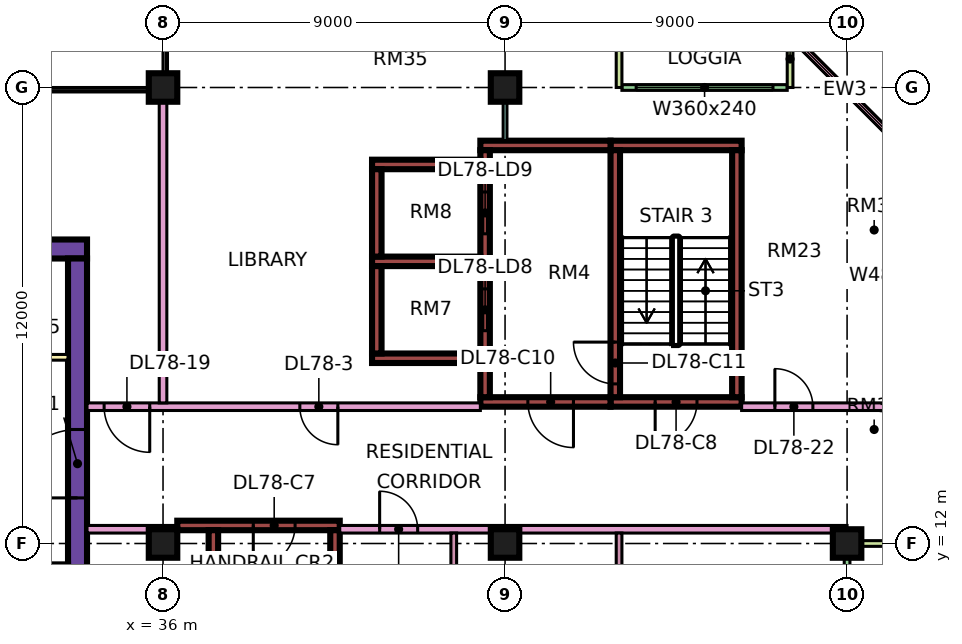
"""IFC4 building model, lengths in metres.
Left out: names, types, materials, properties, quantities, classifications, styles, units other than length and angle.
Written with IfcOpenShell. Run it as: python <this file> out.ifc"""

import sys

from ifc_helpers import new_model, si_unit, direction, frame, frame_2d, origin, origin_2d, place, context, subcontext, project, spatial, rectangle, extrude, element, fill, save


model = new_model("IFC4")
c1 = context("Model", 3, precision=1e-05, world=origin(), true_north=direction((0.0, 1.0)))
c2 = subcontext(c1, "Body", "Model", "MODEL_VIEW")
j1 = project(units=[si_unit("LENGTHUNIT", "METRE"), si_unit("PLANEANGLEUNIT", "RADIAN")], contexts=[c1])
p1 = place(None, origin())
s1 = spatial("IfcSite", under=j1, at=p1, CompositionType="ELEMENT")
p2 = place(p1, origin())
s2 = spatial("IfcBuilding", under=s1, at=p2, CompositionType="ELEMENT")
p3 = place(p2, frame((0.0, 0.0, 338.9)))
s3 = spatial("IfcBuildingStorey", under=s2, at=p3, CompositionType="ELEMENT", Elevation=338.9)
for number, where, z_axis, x_axis in (
    (1, (36.0, 12.0, 0.0), (0.0, 0.0, 1.0), (1.0, 0.0, 0.0)),
    (2, (36.0, 24.0, 0.0), (0.0, 0.0, 1.0), (1.0, 0.0, 0.0)),
    (3, (45.0, 12.0, 0.0), (0.0, 0.0, 1.0), (1.0, 0.0, 0.0)),
    (4, (45.0, 24.0, 0.0), (0.0, 0.0, 1.0), (1.0, 0.0, 0.0)),
    (5, (54.0, 12.0, 0.0), (0.0, 0.0, 1.0), (1.0, 0.0, 0.0)),
):
    element("IfcColumn", number, at=place(p3, frame(where, z_axis=z_axis, x_axis=x_axis)), inside=s3, PredefinedType="COLUMN", context=c2, shape_type="SweptSolid", body=[
        extrude(rectangle(XDim=0.75, YDim=0.75, at=origin_2d()), origin(), (0.0, 0.0, 1.0), 3.75),
    ])
p4 = place(p3, frame((9.0, 19.75, 0.0), z_axis=(0.0, 0.0, 1.0), x_axis=(1.0, 0.0, 0.0)))
e6 = element("IfcWall", 6, at=p4, inside=s3, PredefinedType="SHEAR", context=c2, shape_type="SweptSolid", body=[
    extrude(rectangle(XDim=25.0, YDim=0.5, at=frame_2d((12.5, 0.0))), origin(), (0.0, 0.0, 1.0), 3.75),
])
p5 = place(p4, frame((19.1, 0.0, 0.0)))
e7 = element("IfcOpeningElement", 7, at=p5, cuts=e6, PredefinedType="OPENING", context=c2, shape_type="SweptSolid", body=[
    extrude(rectangle(XDim=1.8, YDim=2.4, at=frame_2d((0.9, 1.2))), frame((0.0, 0.26, 0.0), z_axis=(0.0, -1.0, 0.0), x_axis=(1.0, 0.0, 0.0)), (0.0, 0.0, 1.0), 0.52),
])
p6 = place(p3, frame((33.75, 7.5, 0.0), z_axis=(0.0, 0.0, 1.0), x_axis=(0.0, 1.0, 0.0)))
e8 = element("IfcWall", 8, at=p6, inside=s3, PredefinedType="SHEAR", context=c2, shape_type="SweptSolid", body=[
    extrude(rectangle(XDim=12.0, YDim=0.5, at=frame_2d((6.0, 0.0))), origin(), (0.0, 0.0, 1.0), 3.75),
])
p7 = place(p6, frame((5.7, 0.0, 0.0)))
e9 = element("IfcOpeningElement", 9, at=p7, cuts=e8, PredefinedType="OPENING", context=c2, shape_type="SweptSolid", body=[
    extrude(rectangle(XDim=1.8, YDim=2.4, at=frame_2d((0.9, 1.2))), frame((0.0, 0.26, 0.0), z_axis=(0.0, -1.0, 0.0), x_axis=(1.0, 0.0, 0.0)), (0.0, 0.0, 1.0), 0.52),
])
p8 = place(p3, frame((36.375, 12.475, 0.0), z_axis=(0.0, 0.0, 1.0), x_axis=(1.0, 0.0, 0.0)))
e10 = element("IfcWall", 10, at=p8, inside=s3, PredefinedType="SHEAR", context=c2, shape_type="SweptSolid", body=[
    extrude(rectangle(XDim=4.275, YDim=0.25, at=frame_2d((2.137, 0.0))), origin(), (0.0, 0.0, 1.0), 3.75),
])
p9 = place(p8, frame((2.0, 0.0, 0.0)))
e11 = element("IfcOpeningElement", 11, at=p9, cuts=e10, PredefinedType="OPENING", context=c2, shape_type="SweptSolid", body=[
    extrude(rectangle(XDim=1.1, YDim=2.2, at=frame_2d((0.55, 1.1))), frame((0.0, 0.135, 0.0), z_axis=(0.0, -1.0, 0.0), x_axis=(1.0, 0.0, 0.0)), (0.0, 0.0, 1.0), 0.27),
])
for number, where, z_axis, x_axis in (
    (12, (37.325, 5.85, 0.0), (0.0, 0.0, 1.0), (0.0, 1.0, 0.0)),
    (13, (40.525, 5.85, 0.0), (0.0, 0.0, 1.0), (0.0, 1.0, 0.0)),
):
    element("IfcWall", number, at=place(p3, frame(where, z_axis=z_axis, x_axis=x_axis)), inside=s3, PredefinedType="SHEAR", context=c2, shape_type="SweptSolid", body=[
        extrude(rectangle(XDim=6.5, YDim=0.25, at=frame_2d((3.25, 0.0))), origin(), (0.0, 0.0, 1.0), 3.75),
    ])
p10 = place(p3, frame((47.775, 15.725, 0.0), z_axis=(0.0, 0.0, 1.0), x_axis=(1.0, 0.0, 0.0)))
e14 = element("IfcWall", 14, at=p10, inside=s3, PredefinedType="SHEAR", context=c2, shape_type="SweptSolid", body=[
    extrude(rectangle(XDim=3.45, YDim=0.25, at=frame_2d((1.725, 0.0))), origin(), (0.0, 0.0, 1.0), 3.75),
])
p11 = place(p10, frame((1.175, 0.0, 0.0)))
e15 = element("IfcOpeningElement", 15, at=p11, cuts=e14, PredefinedType="OPENING", context=c2, shape_type="SweptSolid", body=[
    extrude(rectangle(XDim=1.1, YDim=2.2, at=frame_2d((0.55, 1.1))), frame((0.0, 0.135, 0.0), z_axis=(0.0, -1.0, 0.0), x_axis=(1.0, 0.0, 0.0)), (0.0, 0.0, 1.0), 0.27),
])
p12 = place(p3, frame((47.775, 22.475, 0.0), z_axis=(0.0, 0.0, 1.0), x_axis=(1.0, 0.0, 0.0)))
e16 = element("IfcWall", 16, at=p12, inside=s3, PredefinedType="SHEAR", context=c2, shape_type="SweptSolid", body=[
    extrude(rectangle(XDim=3.45, YDim=0.25, at=frame_2d((1.725, 0.0))), origin(), (0.0, 0.0, 1.0), 3.75),
])
p13 = place(p3, frame((47.9, 15.85, 0.0), z_axis=(0.0, 0.0, 1.0), x_axis=(0.0, 1.0, 0.0)))
e17 = element("IfcWall", 17, at=p13, inside=s3, PredefinedType="SHEAR", context=c2, shape_type="SweptSolid", body=[
    extrude(rectangle(XDim=6.5, YDim=0.25, at=frame_2d((3.25, 0.0))), origin(), (0.0, 0.0, 1.0), 3.75),
])
p14 = place(p13, frame((0.35, 0.0, 0.0)))
e18 = element("IfcOpeningElement", 18, at=p14, cuts=e17, PredefinedType="OPENING", context=c2, shape_type="SweptSolid", body=[
    extrude(rectangle(XDim=1.1, YDim=2.2, at=frame_2d((0.55, 1.1))), frame((0.0, 0.135, 0.0), z_axis=(0.0, -1.0, 0.0), x_axis=(1.0, 0.0, 0.0)), (0.0, 0.0, 1.0), 0.27),
])
p15 = place(p3, frame((51.1, 15.85, 0.0), z_axis=(0.0, 0.0, 1.0), x_axis=(0.0, 1.0, 0.0)))
e19 = element("IfcWall", 19, at=p15, inside=s3, PredefinedType="SHEAR", context=c2, shape_type="SweptSolid", body=[
    extrude(rectangle(XDim=6.5, YDim=0.25, at=frame_2d((3.25, 0.0))), origin(), (0.0, 0.0, 1.0), 3.75),
])
p16 = place(p3, frame((44.35, 15.725, 0.0), z_axis=(0.0, 0.0, 1.0), x_axis=(1.0, 0.0, 0.0)))
e20 = element("IfcWall", 20, at=p16, inside=s3, PredefinedType="SHEAR", context=c2, shape_type="SweptSolid", body=[
    extrude(rectangle(XDim=3.425, YDim=0.25, at=frame_2d((1.712, 0.0))), origin(), (0.0, 0.0, 1.0), 3.75),
])
p17 = place(p16, frame((1.25, 0.0, 0.0)))
e21 = element("IfcOpeningElement", 21, at=p17, cuts=e20, PredefinedType="OPENING", context=c2, shape_type="SweptSolid", body=[
    extrude(rectangle(XDim=1.2, YDim=2.2, at=frame_2d((0.6, 1.1))), frame((0.0, 0.135, 0.0), z_axis=(0.0, -1.0, 0.0), x_axis=(1.0, 0.0, 0.0)), (0.0, 0.0, 1.0), 0.27),
])
p18 = place(p3, frame((44.35, 22.475, 0.0), z_axis=(0.0, 0.0, 1.0), x_axis=(1.0, 0.0, 0.0)))
e22 = element("IfcWall", 22, at=p18, inside=s3, PredefinedType="SHEAR", context=c2, shape_type="SweptSolid", body=[
    extrude(rectangle(XDim=3.425, YDim=0.25, at=frame_2d((1.712, 0.0))), origin(), (0.0, 0.0, 1.0), 3.75),
])
p19 = place(p3, frame((44.475, 15.85, 0.0), z_axis=(0.0, 0.0, 1.0), x_axis=(0.0, 1.0, 0.0)))
e23 = element("IfcWall", 23, at=p19, inside=s3, PredefinedType="SHEAR", context=c2, shape_type="SweptSolid", body=[
    extrude(rectangle(XDim=6.5, YDim=0.25, at=frame_2d((3.25, 0.0))), origin(), (0.0, 0.0, 1.0), 3.75),
])
p20 = place(p19, frame((1.75, 0.0, 0.0)))
e24 = element("IfcOpeningElement", 24, at=p20, cuts=e23, PredefinedType="OPENING", context=c2, shape_type="SweptSolid", body=[
    extrude(rectangle(XDim=1.1, YDim=2.2, at=frame_2d((0.55, 1.1))), frame((0.0, 0.135, 0.0), z_axis=(0.0, -1.0, 0.0), x_axis=(1.0, 0.0, 0.0)), (0.0, 0.0, 1.0), 0.27),
])
p21 = place(p19, frame((4.3, 0.0, 0.0)))
e25 = element("IfcOpeningElement", 25, at=p21, cuts=e23, PredefinedType="OPENING", context=c2, shape_type="SweptSolid", body=[
    extrude(rectangle(XDim=1.1, YDim=2.2, at=frame_2d((0.55, 1.1))), frame((0.0, 0.135, 0.0), z_axis=(0.0, -1.0, 0.0), x_axis=(1.0, 0.0, 0.0)), (0.0, 0.0, 1.0), 0.27),
])
for number, where, z_axis, x_axis in (
    (26, (41.5, 16.875, 0.0), (0.0, 0.0, 1.0), (1.0, 0.0, 0.0)),
    (27, (41.5, 19.425, 0.0), (0.0, 0.0, 1.0), (1.0, 0.0, 0.0)),
    (28, (41.5, 21.975, 0.0), (0.0, 0.0, 1.0), (1.0, 0.0, 0.0)),
):
    element("IfcWall", number, at=place(p3, frame(where, z_axis=z_axis, x_axis=x_axis)), inside=s3, PredefinedType="SHEAR", context=c2, shape_type="SweptSolid", body=[
        extrude(rectangle(XDim=2.85, YDim=0.25, at=frame_2d((1.425, 0.0))), origin(), (0.0, 0.0, 1.0), 3.75),
    ])
for number, where, z_axis, x_axis in (
    (29, (41.625, 17.0, 0.0), (0.0, 0.0, 1.0), (0.0, 1.0, 0.0)),
    (30, (41.625, 19.55, 0.0), (0.0, 0.0, 1.0), (0.0, 1.0, 0.0)),
):
    element("IfcWall", number, at=place(p3, frame(where, z_axis=z_axis, x_axis=x_axis)), inside=s3, PredefinedType="SHEAR", context=c2, shape_type="SweptSolid", body=[
        extrude(rectangle(XDim=2.3, YDim=0.25, at=frame_2d((1.15, 0.0))), origin(), (0.0, 0.0, 1.0), 3.75),
    ])
p22 = place(p3, frame((52.425, 24.0, 0.0), z_axis=(0.0, 0.0, 1.0), x_axis=(-1.0, 0.0, 0.0)))
e31 = element("IfcWall", 31, at=p22, inside=s3, PredefinedType="SOLIDWALL", context=c2, shape_type="SweptSolid", body=[
    extrude(rectangle(XDim=4.35, YDim=0.15, at=frame_2d((2.175, 0.0))), origin(), (0.0, 0.0, 1.0), 3.35),
])
p23 = place(p22, frame((0.375, 0.0, 0.45)))
e32 = element("IfcOpeningElement", 32, at=p23, cuts=e31, PredefinedType="OPENING", context=c2, shape_type="SweptSolid", body=[
    extrude(rectangle(XDim=3.6, YDim=2.4, at=frame_2d((1.8, 1.2))), frame((0.0, 0.085, 0.0), z_axis=(0.0, -1.0, 0.0), x_axis=(1.0, 0.0, 0.0)), (0.0, 0.0, 1.0), 0.17),
])
for number, where, z_axis, x_axis in (
    (33, (52.5, 25.5, 0.0), (0.0, 0.0, 1.0), (0.0, -1.0, 0.0)),
    (34, (48.0, 25.5, 0.0), (0.0, 0.0, 1.0), (0.0, -1.0, 0.0)),
):
    element("IfcWall", number, at=place(p3, frame(where, z_axis=z_axis, x_axis=x_axis)), inside=s3, PredefinedType="SOLIDWALL", context=c2, shape_type="SweptSolid", body=[
        extrude(rectangle(XDim=1.5, YDim=0.15, at=frame_2d((0.75, 0.0))), origin(), (0.0, 0.0, 1.0), 3.35),
    ])
p24 = place(p3, frame((54.0, 1.575, 0.0), z_axis=(0.0, 0.0, 1.0), x_axis=(0.0, 1.0, 0.0)))
e35 = element("IfcWall", 35, at=p24, inside=s3, PredefinedType="SOLIDWALL", context=c2, shape_type="SweptSolid", body=[
    extrude(rectangle(XDim=10.35, YDim=0.15, at=frame_2d((5.175, 0.0))), origin(), (0.0, 0.0, 1.0), 3.35),
])
p25 = place(p24, frame((0.663, 0.0, 0.0)))
e36 = element("IfcOpeningElement", 36, at=p25, cuts=e35, PredefinedType="OPENING", context=c2, shape_type="SweptSolid", body=[
    extrude(rectangle(XDim=1.8, YDim=2.4, at=frame_2d((0.9, 1.2))), frame((0.0, 0.085, 0.0), z_axis=(0.0, -1.0, 0.0), x_axis=(1.0, 0.0, 0.0)), (0.0, 0.0, 1.0), 0.17),
])
p26 = place(p24, frame((5.637, 0.0, 0.45)))
e37 = element("IfcOpeningElement", 37, at=p26, cuts=e35, PredefinedType="OPENING", context=c2, shape_type="SweptSolid", body=[
    extrude(rectangle(XDim=3.0, YDim=2.4, at=frame_2d((1.5, 1.2))), frame((0.0, 0.085, 0.0), z_axis=(0.0, -1.0, 0.0), x_axis=(1.0, 0.0, 0.0)), (0.0, 0.0, 1.0), 0.17),
])
p27 = place(p3, frame((55.5, 12.0, 0.0), z_axis=(0.0, 0.0, 1.0), x_axis=(-1.0, 0.0, 0.0)))
e38 = element("IfcWall", 38, at=p27, inside=s3, PredefinedType="SOLIDWALL", context=c2, shape_type="SweptSolid", body=[
    extrude(rectangle(XDim=1.5, YDim=0.15, at=frame_2d((0.75, 0.0))), origin(), (0.0, 0.0, 1.0), 3.35),
])
p28 = place(p3, frame((55.447, 22.447, 0.0), z_axis=(0.0, 0.0, 1.0), x_axis=(-0.707106781187, 0.707106781187, 0.0)))
e39 = element("IfcWall", 39, at=p28, inside=s3, PredefinedType="SOLIDWALL", context=c2, shape_type="SweptSolid", body=[
    extrude(rectangle(XDim=4.243, YDim=0.15, at=frame_2d((2.121, 0.0))), origin(), (0.0, 0.0, 1.0), 3.35),
])
p29 = place(p28, frame((0.621, 0.0, 0.45)))
e40 = element("IfcOpeningElement", 40, at=p29, cuts=e39, PredefinedType="OPENING", context=c2, shape_type="SweptSolid", body=[
    extrude(rectangle(XDim=3.0, YDim=2.4, at=frame_2d((1.5, 1.2))), frame((0.0, 0.085, 0.0), z_axis=(0.0, -1.0, 0.0), x_axis=(1.0, 0.0, 0.0)), (0.0, 0.0, 1.0), 0.17),
])
p30 = place(p3, frame((31.1, 16.9, 0.0), z_axis=(0.0, 0.0, 1.0), x_axis=(1.0, 0.0, 0.0)))
e41 = element("IfcWall", 41, at=p30, inside=s3, PredefinedType="PARTITIONING", context=c2, shape_type="SweptSolid", body=[
    extrude(rectangle(XDim=2.4, YDim=0.15, at=frame_2d((1.2, 0.0))), origin(), (0.0, 0.0, 1.0), 3.35),
])
p31 = place(p3, frame((34.0, 12.375, 0.0), z_axis=(0.0, 0.0, 1.0), x_axis=(1.0, 0.0, 0.0)))
e42 = element("IfcWall", 42, at=p31, inside=s3, PredefinedType="PARTITIONING", context=c2, shape_type="SweptSolid", body=[
    extrude(rectangle(XDim=2.376, YDim=0.2, at=frame_2d((1.188, 0.0))), origin(), (0.0, 0.0, 1.0), 3.35),
])
p32 = place(p3, frame((34.0, 15.6, 0.0), z_axis=(0.0, 0.0, 1.0), x_axis=(1.0, 0.0, 0.0)))
e43 = element("IfcWall", 43, at=p32, inside=s3, PredefinedType="PARTITIONING", context=c2, shape_type="SweptSolid", body=[
    extrude(rectangle(XDim=10.35, YDim=0.2, at=frame_2d((5.175, 0.0))), origin(), (0.0, 0.0, 1.0), 3.35),
])
p33 = place(p32, frame((5.6, 0.0, 0.0)))
e44 = element("IfcOpeningElement", 44, at=p33, cuts=e43, PredefinedType="OPENING", context=c2, shape_type="SweptSolid", body=[
    extrude(rectangle(XDim=1.0, YDim=2.1, at=frame_2d((0.5, 1.05))), frame((0.0, 0.11, 0.0), z_axis=(0.0, -1.0, 0.0), x_axis=(1.0, 0.0, 0.0)), (0.0, 0.0, 1.0), 0.22),
])
p34 = place(p32, frame((0.45, 0.0, 0.0)))
e45 = element("IfcOpeningElement", 45, at=p34, cuts=e43, PredefinedType="OPENING", context=c2, shape_type="SweptSolid", body=[
    extrude(rectangle(XDim=1.2, YDim=2.1, at=frame_2d((0.6, 1.05))), frame((0.0, 0.11, 0.0), z_axis=(0.0, -1.0, 0.0), x_axis=(1.0, 0.0, 0.0)), (0.0, 0.0, 1.0), 0.22),
])
p35 = place(p3, frame((36.0, 15.7, 0.0), z_axis=(0.0, 0.0, 1.0), x_axis=(0.0, 1.0, 0.0)))
e46 = element("IfcWall", 46, at=p35, inside=s3, PredefinedType="PARTITIONING", context=c2, shape_type="SweptSolid", body=[
    extrude(rectangle(XDim=8.3, YDim=0.2, at=frame_2d((4.15, 0.0))), origin(), (0.0, 0.0, 1.0), 3.35),
])
p36 = place(p3, frame((40.65, 12.375, 0.0), z_axis=(0.0, 0.0, 1.0), x_axis=(1.0, 0.0, 0.0)))
e47 = element("IfcWall", 47, at=p36, inside=s3, PredefinedType="PARTITIONING", context=c2, shape_type="SweptSolid", body=[
    extrude(rectangle(XDim=13.35, YDim=0.2, at=frame_2d((6.675, 0.0))), origin(), (0.0, 0.0, 1.0), 3.35),
])
p37 = place(p36, frame((1.05, 0.0, 0.0)))
e48 = element("IfcOpeningElement", 48, at=p37, cuts=e47, PredefinedType="OPENING", context=c2, shape_type="SweptSolid", body=[
    extrude(rectangle(XDim=1.0, YDim=2.1, at=frame_2d((0.5, 1.05))), frame((0.0, 0.11, 0.0), z_axis=(0.0, -1.0, 0.0), x_axis=(1.0, 0.0, 0.0)), (0.0, 0.0, 1.0), 0.22),
])
p38 = place(p3, frame((43.65, 5.975, 0.0), z_axis=(0.0, 0.0, 1.0), x_axis=(0.0, 1.0, 0.0)))
e49 = element("IfcWall", 49, at=p38, inside=s3, PredefinedType="PARTITIONING", context=c2, shape_type="SweptSolid", body=[
    extrude(rectangle(XDim=6.3, YDim=0.15, at=frame_2d((3.15, 0.0))), origin(), (0.0, 0.0, 1.0), 3.35),
])
p39 = place(p38, frame((4.275, 0.0, 0.0)))
e50 = element("IfcOpeningElement", 50, at=p39, cuts=e49, PredefinedType="OPENING", context=c2, shape_type="SweptSolid", body=[
    extrude(rectangle(XDim=0.9, YDim=2.1, at=frame_2d((0.45, 1.05))), frame((0.0, 0.085, 0.0), z_axis=(0.0, -1.0, 0.0), x_axis=(1.0, 0.0, 0.0)), (0.0, 0.0, 1.0), 0.17),
])
p40 = place(p3, frame((45.0, 22.6, 0.0), z_axis=(0.0, 0.0, 1.0), x_axis=(0.0, 1.0, 0.0)))
e51 = element("IfcWall", 51, at=p40, inside=s3, PredefinedType="PARTITIONING", context=c2, shape_type="SweptSolid", body=[
    extrude(rectangle(XDim=1.4, YDim=0.1, at=frame_2d((0.7, 0.0))), origin(), (0.0, 0.0, 1.0), 3.35),
])
p41 = place(p3, frame((48.0, 5.975, 0.0), z_axis=(0.0, 0.0, 1.0), x_axis=(0.0, 1.0, 0.0)))
e52 = element("IfcWall", 52, at=p41, inside=s3, PredefinedType="PARTITIONING", context=c2, shape_type="SweptSolid", body=[
    extrude(rectangle(XDim=6.3, YDim=0.15, at=frame_2d((3.15, 0.0))), origin(), (0.0, 0.0, 1.0), 3.35),
])
p42 = place(p3, frame((51.225, 15.6, 0.0), z_axis=(0.0, 0.0, 1.0), x_axis=(1.0, 0.0, 0.0)))
e53 = element("IfcWall", 53, at=p42, inside=s3, PredefinedType="PARTITIONING", context=c2, shape_type="SweptSolid", body=[
    extrude(rectangle(XDim=4.125, YDim=0.2, at=frame_2d((2.062, 0.0))), origin(), (0.0, 0.0, 1.0), 3.35),
])
p43 = place(p42, frame((0.875, 0.0, 0.0)))
e54 = element("IfcOpeningElement", 54, at=p43, cuts=e53, PredefinedType="OPENING", context=c2, shape_type="SweptSolid", body=[
    extrude(rectangle(XDim=1.0, YDim=2.1, at=frame_2d((0.5, 1.05))), frame((0.0, 0.11, 0.0), z_axis=(0.0, -1.0, 0.0), x_axis=(1.0, 0.0, 0.0)), (0.0, 0.0, 1.0), 0.22),
])
p44 = place(p23, origin())
e55 = element("IfcWindow", 55, at=p44, inside=s3, PartitioningType="SINGLE_PANEL", PredefinedType="WINDOW", context=c2, shape_type="SweptSolid", body=[
    extrude(rectangle(XDim=3.6, YDim=2.4, at=frame_2d((1.8, 1.2))), frame((0.0, 0.03, 0.0), z_axis=(0.0, -1.0, 0.0), x_axis=(1.0, 0.0, 0.0)), (0.0, 0.0, 1.0), 0.06),
])
fill(e32, e55)
p45 = place(p29, origin())
e56 = element("IfcWindow", 56, at=p45, inside=s3, PartitioningType="SINGLE_PANEL", PredefinedType="WINDOW", context=c2, shape_type="SweptSolid", body=[
    extrude(rectangle(XDim=3.0, YDim=2.4, at=frame_2d((1.5, 1.2))), frame((0.0, 0.03, 0.0), z_axis=(0.0, -1.0, 0.0), x_axis=(1.0, 0.0, 0.0)), (0.0, 0.0, 1.0), 0.06),
])
fill(e40, e56)
p46 = place(p7, origin())
e57 = element("IfcDoor", 57, at=p46, inside=s3, OperationType="DOUBLE_DOOR_SINGLE_SWING", PredefinedType="DOOR", context=c2, shape_type="SweptSolid", body=[
    extrude(rectangle(XDim=1.8, YDim=2.4, at=frame_2d((0.9, 1.2))), frame((0.0, 0.025, 0.0), z_axis=(0.0, -1.0, 0.0), x_axis=(1.0, 0.0, 0.0)), (0.0, 0.0, 1.0), 0.05),
])
fill(e9, e57)
p47 = place(p9, frame((1.1, 0.0, 0.0), z_axis=(0.0, 0.0, 1.0), x_axis=(-1.0, 0.0, 0.0)))
e58 = element("IfcDoor", 58, at=p47, inside=s3, OperationType="SINGLE_SWING_LEFT", PredefinedType="DOOR", context=c2, shape_type="SweptSolid", body=[
    extrude(rectangle(XDim=1.1, YDim=2.2, at=frame_2d((0.55, 1.1))), frame((0.0, 0.025, 0.0), z_axis=(0.0, -1.0, 0.0), x_axis=(1.0, 0.0, 0.0)), (0.0, 0.0, 1.0), 0.05),
])
fill(e11, e58)
p48 = place(p11, frame((1.1, 0.0, 0.0), z_axis=(0.0, 0.0, 1.0), x_axis=(-1.0, 0.0, 0.0)))
e59 = element("IfcDoor", 59, at=p48, inside=s3, OperationType="SINGLE_SWING_LEFT", PredefinedType="DOOR", context=c2, shape_type="SweptSolid", body=[
    extrude(rectangle(XDim=1.1, YDim=2.2, at=frame_2d((0.55, 1.1))), frame((0.0, 0.025, 0.0), z_axis=(0.0, -1.0, 0.0), x_axis=(1.0, 0.0, 0.0)), (0.0, 0.0, 1.0), 0.05),
])
fill(e15, e59)
p49 = place(p17, origin())
e60 = element("IfcDoor", 60, at=p49, inside=s3, OperationType="SINGLE_SWING_RIGHT", PredefinedType="DOOR", context=c2, shape_type="SweptSolid", body=[
    extrude(rectangle(XDim=1.2, YDim=2.2, at=frame_2d((0.6, 1.1))), frame((0.0, 0.025, 0.0), z_axis=(0.0, -1.0, 0.0), x_axis=(1.0, 0.0, 0.0)), (0.0, 0.0, 1.0), 0.05),
])
fill(e21, e60)
p50 = place(p14, frame((1.1, 0.0, 0.0), z_axis=(0.0, 0.0, 1.0), x_axis=(-1.0, 0.0, 0.0)))
e61 = element("IfcDoor", 61, at=p50, inside=s3, OperationType="SINGLE_SWING_RIGHT", PredefinedType="DOOR", context=c2, shape_type="SweptSolid", body=[
    extrude(rectangle(XDim=1.1, YDim=2.2, at=frame_2d((0.55, 1.1))), frame((0.0, 0.025, 0.0), z_axis=(0.0, -1.0, 0.0), x_axis=(1.0, 0.0, 0.0)), (0.0, 0.0, 1.0), 0.05),
])
fill(e18, e61)
p51 = place(p20, origin())
e62 = element("IfcDoor", 62, at=p51, inside=s3, OperationType="DOUBLE_DOOR_SLIDING", PredefinedType="DOOR", context=c2, shape_type="SweptSolid", body=[
    extrude(rectangle(XDim=1.1, YDim=2.2, at=frame_2d((0.55, 1.1))), frame((0.0, 0.025, 0.0), z_axis=(0.0, -1.0, 0.0), x_axis=(1.0, 0.0, 0.0)), (0.0, 0.0, 1.0), 0.05),
])
fill(e24, e62)
p52 = place(p21, origin())
e63 = element("IfcDoor", 63, at=p52, inside=s3, OperationType="DOUBLE_DOOR_SLIDING", PredefinedType="DOOR", context=c2, shape_type="SweptSolid", body=[
    extrude(rectangle(XDim=1.1, YDim=2.2, at=frame_2d((0.55, 1.1))), frame((0.0, 0.025, 0.0), z_axis=(0.0, -1.0, 0.0), x_axis=(1.0, 0.0, 0.0)), (0.0, 0.0, 1.0), 0.05),
])
fill(e25, e63)
p53 = place(p33, origin())
e64 = element("IfcDoor", 64, at=p53, inside=s3, OperationType="SINGLE_SWING_RIGHT", PredefinedType="DOOR", context=c2, shape_type="SweptSolid", body=[
    extrude(rectangle(XDim=1.0, YDim=2.1, at=frame_2d((0.5, 1.05))), frame((0.0, 0.025, 0.0), z_axis=(0.0, -1.0, 0.0), x_axis=(1.0, 0.0, 0.0)), (0.0, 0.0, 1.0), 0.05),
])
fill(e44, e64)
p54 = place(p34, origin())
e65 = element("IfcDoor", 65, at=p54, inside=s3, OperationType="SINGLE_SWING_RIGHT", PredefinedType="DOOR", context=c2, shape_type="SweptSolid", body=[
    extrude(rectangle(XDim=1.2, YDim=2.1, at=frame_2d((0.6, 1.05))), frame((0.0, 0.025, 0.0), z_axis=(0.0, -1.0, 0.0), x_axis=(1.0, 0.0, 0.0)), (0.0, 0.0, 1.0), 0.05),
])
fill(e45, e65)
p55 = place(p43, origin())
e66 = element("IfcDoor", 66, at=p55, inside=s3, OperationType="SINGLE_SWING_LEFT", PredefinedType="DOOR", context=c2, shape_type="SweptSolid", body=[
    extrude(rectangle(XDim=1.0, YDim=2.1, at=frame_2d((0.5, 1.05))), frame((0.0, 0.025, 0.0), z_axis=(0.0, -1.0, 0.0), x_axis=(1.0, 0.0, 0.0)), (0.0, 0.0, 1.0), 0.05),
])
fill(e54, e66)
p56 = place(p37, origin())
e67 = element("IfcDoor", 67, at=p56, inside=s3, OperationType="SINGLE_SWING_LEFT", PredefinedType="DOOR", context=c2, shape_type="SweptSolid", body=[
    extrude(rectangle(XDim=1.0, YDim=2.1, at=frame_2d((0.5, 1.05))), frame((0.0, 0.025, 0.0), z_axis=(0.0, -1.0, 0.0), x_axis=(1.0, 0.0, 0.0)), (0.0, 0.0, 1.0), 0.05),
])
fill(e48, e67)
save(model, sys.argv[1])
